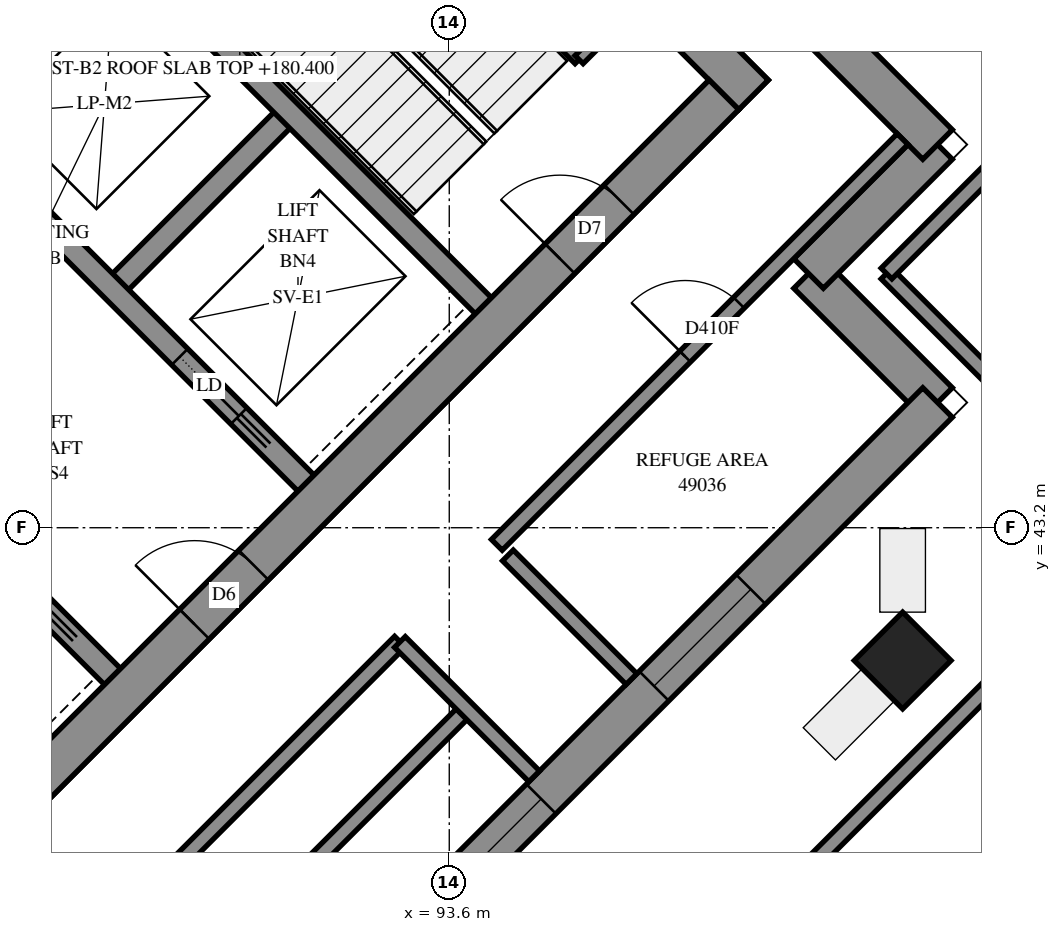
"""IFC4 building model, lengths in metres.
Left out: names, types, materials, properties, quantities, classifications, styles, units other than length and angle.
Written with IfcOpenShell. Run it as: python <this file> out.ifc"""

import sys

from ifc_helpers import new_model, si_unit, direction, frame, frame_2d, origin, origin_2d, place, context, subcontext, project, spatial, polyline, rectangle, outline, extrude, element, fill, save


model = new_model("IFC4")
c1 = context("Model", 3, precision=1e-05, world=origin(), true_north=direction((0.0, 1.0)))
c2 = subcontext(c1, "Body", "Model", "MODEL_VIEW")
j1 = project(units=[si_unit("LENGTHUNIT", "METRE"), si_unit("PLANEANGLEUNIT", "RADIAN")], contexts=[c1])
p1 = place(None, origin())
s1 = spatial("IfcSite", under=j1, at=p1, CompositionType="ELEMENT")
p2 = place(p1, origin())
s2 = spatial("IfcBuilding", under=s1, at=p2, CompositionType="ELEMENT")
p3 = place(p2, frame((0.0, 0.0, 180.4)))
s3 = spatial("IfcBuildingStorey", under=s2, at=p3, CompositionType="ELEMENT", Elevation=180.4)
p4 = place(p3, frame((99.565, 41.453, -0.3), z_axis=(0.0, 0.0, 1.0), x_axis=(0.7071067812, -0.7071067812, 0.0)))
e1 = element("IfcColumn", 1, at=p4, inside=s3, PredefinedType="COLUMN", context=c2, shape_type="SweptSolid", body=[
    extrude(rectangle(XDim=0.9, YDim=0.9, at=origin_2d()), origin(), (0.0, 0.0, 1.0), 5.0),
])
p5 = place(p3, frame((86.642, 59.855, -0.3), z_axis=(0.0, 0.0, 1.0), x_axis=(0.707110007, -0.7071035554, 0.0)))
e2 = element("IfcWall", 2, at=p5, inside=s3, PredefinedType="SHEAR", context=c2, shape_type="SweptSolid", body=[
    extrude(rectangle(XDim=15.5, YDim=0.55, at=frame_2d((7.75, 0.0))), origin(), (0.0, 0.0, 1.0), 4.3),
])
p6 = place(p5, frame((10.55, 0.0, 0.3)))
e3 = element("IfcOpeningElement", 3, at=p6, cuts=e2, PredefinedType="OPENING", context=c2, shape_type="SweptSolid", body=[
    extrude(rectangle(XDim=0.8, YDim=2.1, at=frame_2d((0.4, 1.05))), frame((0.0, 0.285, 0.0), z_axis=(0.0, -1.0, 0.0), x_axis=(1.0, 0.0, 0.0)), (0.0, 0.0, 1.0), 0.57),
])
p7 = place(p3, frame((87.031, 38.713, -0.3), z_axis=(0.0, 0.0, 1.0), x_axis=(0.707103309, 0.7071102534, 0.0)))
e4 = element("IfcWall", 4, at=p7, inside=s3, PredefinedType="SHEAR", context=c2, shape_type="SweptSolid", body=[
    extrude(rectangle(XDim=14.4, YDim=0.55, at=frame_2d((7.2, 0.0))), origin(), (0.0, 0.0, 1.0), 4.3),
])
p8 = place(p7, frame((4.55, 0.0, 0.3)))
e5 = element("IfcOpeningElement", 5, at=p8, cuts=e4, PredefinedType="OPENING", context=c2, shape_type="SweptSolid", body=[
    extrude(rectangle(XDim=1.1, YDim=2.1, at=frame_2d((0.55, 1.05))), frame((0.0, 0.285, 0.0), z_axis=(0.0, -1.0, 0.0), x_axis=(1.0, 0.0, 0.0)), (0.0, 0.0, 1.0), 0.57),
])
p9 = place(p7, frame((11.35, 0.0, 0.3)))
e6 = element("IfcOpeningElement", 6, at=p9, cuts=e4, PredefinedType="OPENING", context=c2, shape_type="SweptSolid", body=[
    extrude(rectangle(XDim=1.1, YDim=2.1, at=frame_2d((0.55, 1.05))), frame((0.0, 0.285, 0.0), z_axis=(0.0, -1.0, 0.0), x_axis=(1.0, 0.0, 0.0)), (0.0, 0.0, 1.0), 0.57),
])
for number, where, z_axis, x_axis in (
    (7, (86.625, 48.878, 0.0), (0.0, 0.0, 1.0), (0.707, 0.707, 0.0)),
    (8, (89.17, 46.332, 0.0), (0.0, 0.0, 1.0), (0.707, 0.707, 0.0)),
):
    element("IfcWall", number, at=place(p3, frame(where, z_axis=z_axis, x_axis=x_axis)), inside=s3, PredefinedType="SOLIDWALL", context=c2, shape_type="SweptSolid", body=[
        extrude(rectangle(XDim=3.3, YDim=0.3, at=frame_2d((1.65, 0.0))), origin(), (0.0, 0.0, 1.0), 4.7),
    ])
p10 = place(p3, frame((78.988, 51.423, 0.0), z_axis=(0.0, 0.0, 1.0), x_axis=(0.7071067812, -0.7071067812, 0.0)))
e9 = element("IfcWall", 9, at=p10, inside=s3, PredefinedType="SOLIDWALL", context=c2, shape_type="SweptSolid", body=[
    extrude(rectangle(XDim=14.4, YDim=0.3, at=frame_2d((7.2, 0.0))), origin(), (0.0, 0.0, 1.0), 4.7),
])
p11 = place(p10, frame((1.35, 0.0, 0.0)))
e10 = element("IfcOpeningElement", 10, at=p11, cuts=e9, PredefinedType="OPENING", context=c2, shape_type="SweptSolid", body=[
    extrude(rectangle(XDim=0.9, YDim=2.1, at=frame_2d((0.45, 1.05))), frame((0.0, 0.16, 0.0), z_axis=(0.0, -1.0, 0.0), x_axis=(1.0, 0.0, 0.0)), (0.0, 0.0, 1.0), 0.32),
])
p12 = place(p10, frame((4.95, 0.0, 0.0)))
e11 = element("IfcOpeningElement", 11, at=p12, cuts=e9, PredefinedType="OPENING", context=c2, shape_type="SweptSolid", body=[
    extrude(rectangle(XDim=0.9, YDim=2.1, at=frame_2d((0.45, 1.05))), frame((0.0, 0.16, 0.0), z_axis=(0.0, -1.0, 0.0), x_axis=(1.0, 0.0, 0.0)), (0.0, 0.0, 1.0), 0.32),
])
p13 = place(p10, frame((8.55, 0.0, 0.0)))
e12 = element("IfcOpeningElement", 12, at=p13, cuts=e9, PredefinedType="OPENING", context=c2, shape_type="SweptSolid", body=[
    extrude(rectangle(XDim=0.9, YDim=2.1, at=frame_2d((0.45, 1.05))), frame((0.0, 0.16, 0.0), z_axis=(0.0, -1.0, 0.0), x_axis=(1.0, 0.0, 0.0)), (0.0, 0.0, 1.0), 0.32),
])
p14 = place(p10, frame((12.05, 0.0, 0.0)))
e13 = element("IfcOpeningElement", 13, at=p14, cuts=e9, PredefinedType="OPENING", context=c2, shape_type="SweptSolid", body=[
    extrude(rectangle(XDim=1.1, YDim=2.1, at=frame_2d((0.55, 1.05))), frame((0.0, 0.16, 0.0), z_axis=(0.0, -1.0, 0.0), x_axis=(1.0, 0.0, 0.0)), (0.0, 0.0, 1.0), 0.32),
])
p15 = place(p3, frame((81.534, 53.969, 0.0), z_axis=(0.0, 0.0, 1.0), x_axis=(0.707103309, -0.7071102534, 0.0)))
e14 = element("IfcWall", 14, at=p15, inside=s3, PredefinedType="SOLIDWALL", context=c2, shape_type="SweptSolid", body=[
    extrude(rectangle(XDim=14.4, YDim=0.3, at=frame_2d((7.2, 0.0))), origin(), (0.0, 0.0, 1.0), 4.7),
])
p16 = place(p15, frame((1.25, 0.0, 0.0)))
e15 = element("IfcOpeningElement", 15, at=p16, cuts=e14, PredefinedType="OPENING", context=c2, shape_type="SweptSolid", body=[
    extrude(rectangle(XDim=1.1, YDim=2.1, at=frame_2d((0.55, 1.05))), frame((0.0, 0.16, 0.0), z_axis=(0.0, -1.0, 0.0), x_axis=(1.0, 0.0, 0.0)), (0.0, 0.0, 1.0), 0.32),
])
p17 = place(p15, frame((4.85, 0.0, 0.0)))
e16 = element("IfcOpeningElement", 16, at=p17, cuts=e14, PredefinedType="OPENING", context=c2, shape_type="SweptSolid", body=[
    extrude(rectangle(XDim=1.1, YDim=2.1, at=frame_2d((0.55, 1.05))), frame((0.0, 0.16, 0.0), z_axis=(0.0, -1.0, 0.0), x_axis=(1.0, 0.0, 0.0)), (0.0, 0.0, 1.0), 0.32),
])
p18 = place(p15, frame((8.45, 0.0, 0.0)))
e17 = element("IfcOpeningElement", 17, at=p18, cuts=e14, PredefinedType="OPENING", context=c2, shape_type="SweptSolid", body=[
    extrude(rectangle(XDim=1.1, YDim=2.1, at=frame_2d((0.55, 1.05))), frame((0.0, 0.16, 0.0), z_axis=(0.0, -1.0, 0.0), x_axis=(1.0, 0.0, 0.0)), (0.0, 0.0, 1.0), 0.32),
])
p19 = place(p15, frame((12.05, 0.0, 0.0)))
e18 = element("IfcOpeningElement", 18, at=p19, cuts=e14, PredefinedType="OPENING", context=c2, shape_type="SweptSolid", body=[
    extrude(rectangle(XDim=1.1, YDim=2.1, at=frame_2d((0.55, 1.05))), frame((0.0, 0.16, 0.0), z_axis=(0.0, -1.0, 0.0), x_axis=(1.0, 0.0, 0.0)), (0.0, 0.0, 1.0), 0.32),
])
p20 = place(p3, frame((88.958, 51.211, 0.0), z_axis=(0.0, 0.0, 1.0), x_axis=(0.7070998367, -0.7071137256, 0.0)))
e19 = element("IfcWall", 19, at=p20, inside=s3, PredefinedType="SOLIDWALL", context=c2, shape_type="SweptSolid", body=[
    extrude(rectangle(XDim=7.2, YDim=0.3, at=frame_2d((3.6, 0.0))), origin(), (0.0, 0.0, 1.0), 4.7),
])
p21 = place(p3, frame((100.024, 44.847, 0.0), z_axis=(0.0, 0.0, 1.0), x_axis=(-0.7071067812, 0.7071067812, 0.0)))
e20 = element("IfcWall", 20, at=p21, inside=s3, PredefinedType="SOLIDWALL", context=c2, shape_type="SweptSolid", body=[
    extrude(outline(polyline([(-0.275, -0.275), (2.125, -0.275), (2.675, 0.275), (0.275, 0.275), (-0.275, -0.275)])), origin(), (0.0, 0.0, 1.0), 4.7),
])
p22 = place(p3, frame((98.327, 46.544, 0.0), z_axis=(0.0, 0.0, 1.0), x_axis=(0.7071276143, 0.7070859475, 0.0)))
e21 = element("IfcWall", 21, at=p22, inside=s3, PredefinedType="SOLIDWALL", context=c2, shape_type="SweptSolid", body=[
    extrude(outline(polyline([(0.275, -0.275), (2.675, -0.275), (2.125, 0.275), (-0.275, 0.275), (0.275, -0.275)])), origin(), (0.0, 0.0, 1.0), 4.7),
])
p23 = place(p3, frame((100.024, 48.241, 0.0), z_axis=(0.0, 0.0, 1.0), x_axis=(-0.7071067812, 0.7071067812, 0.0)))
e22 = element("IfcWall", 22, at=p23, inside=s3, PredefinedType="SOLIDWALL", context=c2, shape_type="SweptSolid", body=[
    extrude(outline(polyline([(-0.275, -0.275), (30.779, -0.275), (30.552, 0.275), (0.275, 0.275), (-0.275, -0.275)])), origin(), (0.0, 0.0, 1.0), 4.7),
])
p24 = place(p23, frame((3.625, 0.0, 0.9)))
e23 = element("IfcOpeningElement", 23, at=p24, cuts=e22, PredefinedType="OPENING", context=c2, shape_type="SweptSolid", body=[
    extrude(rectangle(XDim=1.8, YDim=3.6, at=frame_2d((0.9, 1.8))), frame((0.0, 0.285, 0.0), z_axis=(0.0, -1.0, 0.0), x_axis=(1.0, 0.0, 0.0)), (0.0, 0.0, 1.0), 0.57),
])
p25 = place(p23, frame((7.225, 0.0, 0.9)))
e24 = element("IfcOpeningElement", 24, at=p25, cuts=e22, PredefinedType="OPENING", context=c2, shape_type="SweptSolid", body=[
    extrude(rectangle(XDim=1.8, YDim=3.6, at=frame_2d((0.9, 1.8))), frame((0.0, 0.285, 0.0), z_axis=(0.0, -1.0, 0.0), x_axis=(1.0, 0.0, 0.0)), (0.0, 0.0, 1.0), 0.57),
])
p26 = place(p23, frame((10.825, 0.0, 0.9)))
e25 = element("IfcOpeningElement", 25, at=p26, cuts=e22, PredefinedType="OPENING", context=c2, shape_type="SweptSolid", body=[
    extrude(rectangle(XDim=1.8, YDim=3.6, at=frame_2d((0.9, 1.8))), frame((0.0, 0.285, 0.0), z_axis=(0.0, -1.0, 0.0), x_axis=(1.0, 0.0, 0.0)), (0.0, 0.0, 1.0), 0.57),
])
p27 = place(p23, frame((14.425, 0.0, 0.9)))
e26 = element("IfcOpeningElement", 26, at=p27, cuts=e22, PredefinedType="OPENING", context=c2, shape_type="SweptSolid", body=[
    extrude(rectangle(XDim=1.8, YDim=3.6, at=frame_2d((0.9, 1.8))), frame((0.0, 0.285, 0.0), z_axis=(0.0, -1.0, 0.0), x_axis=(1.0, 0.0, 0.0)), (0.0, 0.0, 1.0), 0.57),
])
p28 = place(p23, frame((17.575, 0.0, 0.9)))
e27 = element("IfcOpeningElement", 27, at=p28, cuts=e22, PredefinedType="OPENING", context=c2, shape_type="SweptSolid", body=[
    extrude(rectangle(XDim=1.8, YDim=3.6, at=frame_2d((0.9, 1.8))), frame((0.0, 0.285, 0.0), z_axis=(0.0, -1.0, 0.0), x_axis=(1.0, 0.0, 0.0)), (0.0, 0.0, 1.0), 0.57),
])
p29 = place(p23, frame((21.625, 0.0, 0.9)))
e28 = element("IfcOpeningElement", 28, at=p29, cuts=e22, PredefinedType="OPENING", context=c2, shape_type="SweptSolid", body=[
    extrude(rectangle(XDim=1.8, YDim=3.6, at=frame_2d((0.9, 1.8))), frame((0.0, 0.285, 0.0), z_axis=(0.0, -1.0, 0.0), x_axis=(1.0, 0.0, 0.0)), (0.0, 0.0, 1.0), 0.57),
])
p30 = place(p23, frame((25.225, 0.0, 0.9)))
e29 = element("IfcOpeningElement", 29, at=p30, cuts=e22, PredefinedType="OPENING", context=c2, shape_type="SweptSolid", body=[
    extrude(rectangle(XDim=1.8, YDim=3.6, at=frame_2d((0.9, 1.8))), frame((0.0, 0.285, 0.0), z_axis=(0.0, -1.0, 0.0), x_axis=(1.0, 0.0, 0.0)), (0.0, 0.0, 1.0), 0.57),
])
p31 = place(p23, frame((28.438, 0.0, 0.9)))
e30 = element("IfcOpeningElement", 30, at=p31, cuts=e22, PredefinedType="OPENING", context=c2, shape_type="SweptSolid", body=[
    extrude(rectangle(XDim=1.8, YDim=3.6, at=frame_2d((0.9, 1.8))), frame((0.0, 0.285, 0.0), z_axis=(0.0, -1.0, 0.0), x_axis=(1.0, 0.0, 0.0)), (0.0, 0.0, 1.0), 0.57),
])
p32 = place(p3, frame((78.312, 45.275, 0.0), z_axis=(0.0, 0.0, 1.0), x_axis=(0.7071035873, -0.707109975, 0.0)))
e31 = element("IfcWall", 31, at=p32, inside=s3, PredefinedType="SOLIDWALL", context=c2, shape_type="SweptSolid", body=[
    extrude(outline(polyline([(0.114, -0.275), (15.93, -0.275), (15.38, 0.275), (-0.114, 0.275), (0.114, -0.275)])), origin(), (0.0, 0.0, 1.0), 4.7),
])
p33 = place(p32, frame((4.23, 0.0, 0.9)))
e32 = element("IfcOpeningElement", 32, at=p33, cuts=e31, PredefinedType="OPENING", context=c2, shape_type="SweptSolid", body=[
    extrude(rectangle(XDim=1.8, YDim=3.6, at=frame_2d((0.9, 1.8))), frame((0.0, 0.285, 0.0), z_axis=(0.0, -1.0, 0.0), x_axis=(1.0, 0.0, 0.0)), (0.0, 0.0, 1.0), 0.57),
])
p34 = place(p32, frame((7.83, 0.0, 0.9)))
e33 = element("IfcOpeningElement", 33, at=p34, cuts=e31, PredefinedType="OPENING", context=c2, shape_type="SweptSolid", body=[
    extrude(rectangle(XDim=1.8, YDim=3.6, at=frame_2d((0.9, 1.8))), frame((0.0, 0.285, 0.0), z_axis=(0.0, -1.0, 0.0), x_axis=(1.0, 0.0, 0.0)), (0.0, 0.0, 1.0), 0.57),
])
p35 = place(p32, frame((10.53, 0.0, 0.9)))
e34 = element("IfcOpeningElement", 34, at=p35, cuts=e31, PredefinedType="OPENING", context=c2, shape_type="SweptSolid", body=[
    extrude(rectangle(XDim=1.8, YDim=3.6, at=frame_2d((0.9, 1.8))), frame((0.0, 0.285, 0.0), z_axis=(0.0, -1.0, 0.0), x_axis=(1.0, 0.0, 0.0)), (0.0, 0.0, 1.0), 0.57),
])
p36 = place(p3, frame((89.382, 34.205, 0.0), z_axis=(0.0, 0.0, 1.0), x_axis=(0.7071067812, 0.7071067812, 0.0)))
e35 = element("IfcWall", 35, at=p36, inside=s3, PredefinedType="SOLIDWALL", context=c2, shape_type="SweptSolid", body=[
    extrude(outline(polyline([(-0.275, -0.275), (15.325, -0.275), (14.775, 0.275), (0.275, 0.275), (-0.275, -0.275)])), origin(), (0.0, 0.0, 1.0), 4.7),
])
p37 = place(p36, frame((2.425, 0.0, 0.9)))
e36 = element("IfcOpeningElement", 36, at=p37, cuts=e35, PredefinedType="OPENING", context=c2, shape_type="SweptSolid", body=[
    extrude(rectangle(XDim=1.8, YDim=3.6, at=frame_2d((0.9, 1.8))), frame((0.0, 0.285, 0.0), z_axis=(0.0, -1.0, 0.0), x_axis=(1.0, 0.0, 0.0)), (0.0, 0.0, 1.0), 0.57),
])
p38 = place(p36, frame((5.875, 0.0, 0.9)))
e37 = element("IfcOpeningElement", 37, at=p38, cuts=e35, PredefinedType="OPENING", context=c2, shape_type="SweptSolid", body=[
    extrude(rectangle(XDim=1.8, YDim=3.6, at=frame_2d((0.9, 1.8))), frame((0.0, 0.285, 0.0), z_axis=(0.0, -1.0, 0.0), x_axis=(1.0, 0.0, 0.0)), (0.0, 0.0, 1.0), 0.57),
])
p39 = place(p36, frame((9.775, 0.0, 0.9)))
e38 = element("IfcOpeningElement", 38, at=p39, cuts=e35, PredefinedType="OPENING", context=c2, shape_type="SweptSolid", body=[
    extrude(rectangle(XDim=1.8, YDim=3.6, at=frame_2d((0.9, 1.8))), frame((0.0, 0.285, 0.0), z_axis=(0.0, -1.0, 0.0), x_axis=(1.0, 0.0, 0.0)), (0.0, 0.0, 1.0), 0.57),
])
p40 = place(p3, frame((102.747, 43.15, 0.0), z_axis=(0.0, 0.0, 1.0), x_axis=(-0.7071067812, 0.7071067812, 0.0)))
e39 = element("IfcWall", 39, at=p40, inside=s3, PredefinedType="SOLIDWALL", context=c2, shape_type="SweptSolid", body=[
    extrude(outline(polyline([(-0.1, -0.1), (4.7, -0.1), (4.9, 0.1), (0.1, 0.1), (-0.1, -0.1)])), origin(), (0.0, 0.0, 1.0), 4.7),
])
p41 = place(p3, frame((99.353, 46.544, 0.0), z_axis=(0.0, 0.0, 1.0), x_axis=(0.7071171977, 0.7070963646, 0.0)))
e40 = element("IfcWall", 40, at=p41, inside=s3, PredefinedType="SOLIDWALL", context=c2, shape_type="SweptSolid", body=[
    extrude(outline(polyline([(0.1, -0.1), (4.9, -0.1), (4.7, 0.1), (-0.1, 0.1), (0.1, -0.1)])), origin(), (0.0, 0.0, 1.0), 4.7),
])
p42 = place(p3, frame((77.018, 42.15, 0.0), z_axis=(0.0, 0.0, 1.0), x_axis=(0.7071039217, -0.7071096407, 0.0)))
e41 = element("IfcWall", 41, at=p42, inside=s3, PredefinedType="SOLIDWALL", context=c2, shape_type="SweptSolid", body=[
    extrude(outline(polyline([(0.041, -0.1), (17.586, -0.1), (17.386, 0.1), (-0.041, 0.1), (0.041, -0.1)])), origin(), (0.0, 0.0, 1.0), 4.7),
])
p43 = place(p3, frame((89.382, 29.786, 0.0), z_axis=(0.0, 0.0, 1.0), x_axis=(0.7071094267, 0.7071041357, 0.0)))
e42 = element("IfcWall", 42, at=p43, inside=s3, PredefinedType="SOLIDWALL", context=c2, shape_type="SweptSolid", body=[
    extrude(outline(polyline([(-0.1, -0.1), (19.0, -0.1), (18.8, 0.1), (0.1, 0.1), (-0.1, -0.1)])), origin(), (0.0, 0.0, 1.0), 4.7),
])
p44 = place(p3, frame((91.313, 53.354, 0.0), z_axis=(0.0, 0.0, 1.0), x_axis=(0.7071067812, -0.7071067812, 0.0)))
e43 = element("IfcWall", 43, at=p44, inside=s3, PredefinedType="PARTITIONING", context=c2, shape_type="SweptSolid", body=[
    extrude(rectangle(XDim=5.65, YDim=0.15, at=frame_2d((2.825, 0.0))), origin(), (0.0, 0.0, 1.0), 4.7),
])
p45 = place(p3, frame((95.308, 49.358, 0.0), z_axis=(0.0, 0.0, 1.0), x_axis=(0.70705776, 0.707155799, 0.0)))
e44 = element("IfcWall", 44, at=p45, inside=s3, PredefinedType="PARTITIONING", context=c2, shape_type="SweptSolid", body=[
    extrude(rectangle(XDim=1.02, YDim=0.15, at=frame_2d((0.51, 0.0))), origin(), (0.0, 0.0, 1.0), 4.7),
])
p46 = place(p3, frame((88.495, 35.481, 0.0), z_axis=(0.0, 0.0, 1.0), x_axis=(0.7072325932, 0.7069809467, 0.0)))
e45 = element("IfcWall", 45, at=p46, inside=s3, PredefinedType="PARTITIONING", context=c2, shape_type="SweptSolid", body=[
    extrude(rectangle(XDim=7.55, YDim=0.2, at=frame_2d((3.775, 0.0))), origin(), (0.0, 0.0, 1.0), 4.7),
])
p47 = place(p3, frame((94.225, 42.974, 0.0), z_axis=(0.0, 0.0, 1.0), x_axis=(0.7071134042, 0.7071001581, 0.0)))
e46 = element("IfcWall", 46, at=p47, inside=s3, PredefinedType="PARTITIONING", context=c2, shape_type="SweptSolid", body=[
    extrude(rectangle(XDim=7.549, YDim=0.2, at=frame_2d((3.775, 0.0))), origin(), (0.0, 0.0, 1.0), 4.7),
])
p48 = place(p47, frame((3.504, 0.0, 0.0)))
e47 = element("IfcOpeningElement", 47, at=p48, cuts=e46, PredefinedType="OPENING", context=c2, shape_type="SweptSolid", body=[
    extrude(rectangle(XDim=1.0, YDim=2.1, at=frame_2d((0.5, 1.05))), frame((0.0, 0.11, 0.0), z_axis=(0.0, -1.0, 0.0), x_axis=(1.0, 0.0, 0.0)), (0.0, 0.0, 1.0), 0.22),
])
p49 = place(p3, frame((87.614, 36.363, 0.0), z_axis=(0.0, 0.0, 1.0), x_axis=(0.7071001576, 0.7071134047, 0.0)))
e48 = element("IfcWall", 48, at=p49, inside=s3, PredefinedType="PARTITIONING", context=c2, shape_type="SweptSolid", body=[
    extrude(rectangle(XDim=7.549, YDim=0.2, at=frame_2d((3.774, 0.0))), origin(), (0.0, 0.0, 1.0), 4.7),
])
p50 = place(p49, frame((0.595, 0.0, 0.0)))
e49 = element("IfcOpeningElement", 49, at=p50, cuts=e48, PredefinedType="OPENING", context=c2, shape_type="SweptSolid", body=[
    extrude(rectangle(XDim=1.0, YDim=2.1, at=frame_2d((0.5, 1.05))), frame((0.0, 0.11, 0.0), z_axis=(0.0, -1.0, 0.0), x_axis=(1.0, 0.0, 0.0)), (0.0, 0.0, 1.0), 0.22),
])
p51 = place(p3, frame((92.951, 41.697, 0.0), z_axis=(0.0, 0.0, 1.0), x_axis=(0.7071267879, -0.7070867739, 0.0)))
e50 = element("IfcWall", 50, at=p51, inside=s3, PredefinedType="PARTITIONING", context=c2, shape_type="SweptSolid", body=[
    extrude(rectangle(XDim=2.499, YDim=0.2, at=frame_2d((1.25, 0.0))), origin(), (0.0, 0.0, 1.0), 4.7),
])
p52 = place(p3, frame((94.371, 42.836, 0.0), z_axis=(0.0, 0.0, 1.0), x_axis=(0.7071067812, -0.7071067812, 0.0)))
e51 = element("IfcWall", 51, at=p52, inside=s3, PredefinedType="PARTITIONING", context=c2, shape_type="SweptSolid", body=[
    extrude(rectangle(XDim=2.3, YDim=0.2, at=frame_2d((1.15, 0.0))), origin(), (0.0, 0.0, 1.0), 4.7),
])
p53 = place(p38, origin())
e52 = element("IfcWindow", 52, at=p53, inside=s3, PartitioningType="SINGLE_PANEL", PredefinedType="WINDOW", context=c2, shape_type="SweptSolid", body=[
    extrude(rectangle(XDim=1.8, YDim=3.6, at=frame_2d((0.9, 1.8))), frame((0.0, 0.155, 0.0), z_axis=(0.0, -1.0, 0.0), x_axis=(1.0, 0.0, 0.0)), (0.0, 0.0, 1.0), 0.06),
])
fill(e37, e52)
p54 = place(p39, origin())
e53 = element("IfcWindow", 53, at=p54, inside=s3, PartitioningType="SINGLE_PANEL", PredefinedType="WINDOW", context=c2, shape_type="SweptSolid", body=[
    extrude(rectangle(XDim=1.8, YDim=3.6, at=frame_2d((0.9, 1.8))), frame((0.0, 0.155, 0.0), z_axis=(0.0, -1.0, 0.0), x_axis=(1.0, 0.0, 0.0)), (0.0, 0.0, 1.0), 0.06),
])
fill(e38, e53)
p55 = place(p8, origin())
e54 = element("IfcDoor", 54, at=p55, inside=s3, OperationType="DOUBLE_DOOR_SINGLE_SWING", PredefinedType="DOOR", context=c2, shape_type="SweptSolid", body=[
    extrude(rectangle(XDim=1.1, YDim=2.1, at=frame_2d((0.55, 1.05))), frame((0.0, 0.025, 0.0), z_axis=(0.0, -1.0, 0.0), x_axis=(1.0, 0.0, 0.0)), (0.0, 0.0, 1.0), 0.05),
])
fill(e5, e54)
p56 = place(p9, origin())
e55 = element("IfcDoor", 55, at=p56, inside=s3, OperationType="SINGLE_SWING_RIGHT", PredefinedType="DOOR", context=c2, shape_type="SweptSolid", body=[
    extrude(rectangle(XDim=1.1, YDim=2.1, at=frame_2d((0.55, 1.05))), frame((0.0, 0.025, 0.0), z_axis=(0.0, -1.0, 0.0), x_axis=(1.0, 0.0, 0.0)), (0.0, 0.0, 1.0), 0.05),
])
fill(e6, e55)
p57 = place(p19, origin())
e56 = element("IfcDoor", 56, at=p57, inside=s3, OperationType="SLIDING_TO_RIGHT", PredefinedType="DOOR", context=c2, shape_type="SweptSolid", body=[
    extrude(rectangle(XDim=1.1, YDim=2.1, at=frame_2d((0.55, 1.05))), frame((0.0, 0.025, 0.0), z_axis=(0.0, -1.0, 0.0), x_axis=(1.0, 0.0, 0.0)), (0.0, 0.0, 1.0), 0.05),
])
fill(e18, e56)
p58 = place(p48, origin())
e57 = element("IfcDoor", 57, at=p58, inside=s3, OperationType="SINGLE_SWING_LEFT", PredefinedType="DOOR", context=c2, shape_type="SweptSolid", body=[
    extrude(rectangle(XDim=1.0, YDim=2.1, at=frame_2d((0.5, 1.05))), frame((0.0, 0.025, 0.0), z_axis=(0.0, -1.0, 0.0), x_axis=(1.0, 0.0, 0.0)), (0.0, 0.0, 1.0), 0.05),
])
fill(e47, e57)
save(model, sys.argv[1])
